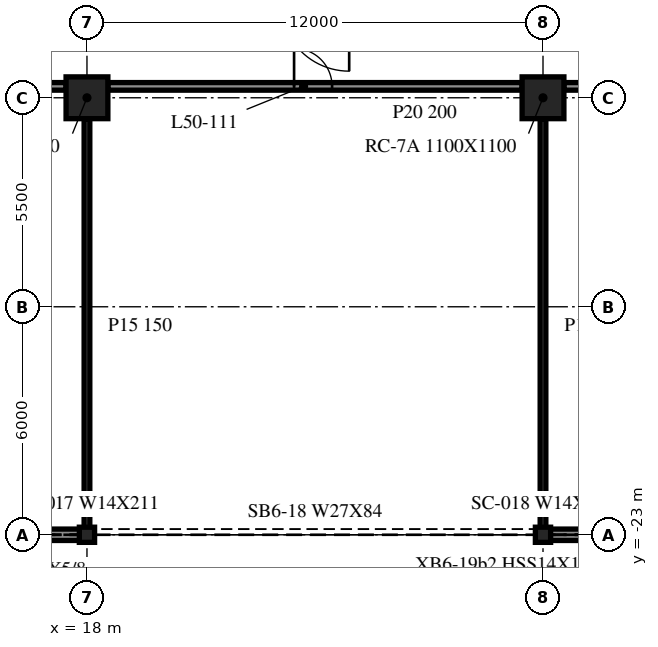
"""IFC4 building model, lengths in metres.
Left out: names, types, materials, properties, quantities, classifications, styles, units other than length and angle.
Written with IfcOpenShell. Run it as: python <this file> out.ifc"""

import sys

from ifc_helpers import new_model, si_unit, direction, frame, frame_2d, origin, origin_2d, place, context, subcontext, project, spatial, rectangle, i_section, extrude, element, fill, save


model = new_model("IFC4")
c1 = context("Model", 3, precision=1e-05, world=origin(), true_north=direction((0.0, 1.0)))
c2 = subcontext(c1, "Body", "Model", "MODEL_VIEW")
j1 = project(units=[si_unit("LENGTHUNIT", "METRE"), si_unit("PLANEANGLEUNIT", "RADIAN")], contexts=[c1])
p1 = place(None, origin())
s1 = spatial("IfcSite", under=j1, at=p1, CompositionType="ELEMENT")
p2 = place(p1, origin())
s2 = spatial("IfcBuilding", under=s1, at=p2, CompositionType="ELEMENT")
p3 = place(p2, frame((0.0, 0.0, 209.1)))
s3 = spatial("IfcBuildingStorey", under=s2, at=p3, CompositionType="ELEMENT", Elevation=209.1)
for number, where, z_axis, x_axis in (
    (1, (18.0, -11.5, -0.34), (0.0, 0.0, 1.0), (1.0, 0.0, 0.0)),
    (2, (30.0, -11.5, -0.34), (0.0, 0.0, 1.0), (1.0, 0.0, 0.0)),
):
    element("IfcColumn", number, at=place(p3, frame(where, z_axis=z_axis, x_axis=x_axis)), inside=s3, PredefinedType="COLUMN", context=c2, shape_type="SweptSolid", body=[
        extrude(rectangle(XDim=1.1, YDim=1.1, at=origin_2d()), origin(), (0.0, 0.0, 1.0), 3.8),
    ])
for number, where, z_axis, x_axis in (
    (3, (18.0, -23.0, -0.34), (0.0, 0.0, 1.0), (1.0, 0.0, 0.0)),
    (4, (30.0, -23.0, -0.34), (0.0, 0.0, 1.0), (1.0, 0.0, 0.0)),
):
    element("IfcColumn", number, at=place(p3, frame(where, z_axis=z_axis, x_axis=x_axis)), inside=s3, PredefinedType="COLUMN", context=c2, shape_type="SweptSolid", body=[
        extrude(i_section(OverallWidth=0.401, OverallDepth=0.399, WebThickness=0.025, FlangeThickness=0.04, at=origin_2d()), origin(), (0.0, 0.0, 1.0), 3.8),
    ])
for number, where, z_axis, x_axis in (
    (5, (6.012, -23.0, 0.0), (0.0, 0.0, 1.0), (1.0, 0.0, 0.0)),
    (6, (30.012, -23.0, 0.0), (0.0, 0.0, 1.0), (1.0, 0.0, 0.0)),
):
    element("IfcWall", number, at=place(p3, frame(where, z_axis=z_axis, x_axis=x_axis)), inside=s3, PredefinedType="NOTDEFINED", context=c2, shape_type="SweptSolid", body=[
        extrude(rectangle(XDim=11.975, YDim=0.3, at=frame_2d((5.988, 0.0))), origin(), (0.0, 0.0, 1.0), 2.782),
    ])
p4 = place(p3, frame((6.55, -11.2, 0.0), z_axis=(0.0, 0.0, 1.0), x_axis=(1.0, 0.0, 0.0)))
e7 = element("IfcWall", 7, at=p4, inside=s3, PredefinedType="PARTITIONING", context=c2, shape_type="SweptSolid", body=[
    extrude(rectangle(XDim=10.9, YDim=0.2, at=frame_2d((5.45, 0.0))), origin(), (0.0, 0.0, 1.0), 3.46),
])
p5 = place(p4, frame((1.3, 0.0, 0.0)))
e8 = element("IfcOpeningElement", 8, at=p5, cuts=e7, PredefinedType="OPENING", context=c2, shape_type="SweptSolid", body=[
    extrude(rectangle(XDim=0.9, YDim=2.1, at=frame_2d((0.45, 1.05))), frame((0.0, 0.11, 0.0), z_axis=(0.0, -1.0, 0.0), x_axis=(1.0, 0.0, 0.0)), (0.0, 0.0, 1.0), 0.22),
])
p6 = place(p4, frame((4.1, 0.0, 0.0)))
e9 = element("IfcOpeningElement", 9, at=p6, cuts=e7, PredefinedType="OPENING", context=c2, shape_type="SweptSolid", body=[
    extrude(rectangle(XDim=1.0, YDim=2.1, at=frame_2d((0.5, 1.05))), frame((0.0, 0.11, 0.0), z_axis=(0.0, -1.0, 0.0), x_axis=(1.0, 0.0, 0.0)), (0.0, 0.0, 1.0), 0.22),
])
p7 = place(p4, frame((5.7, 0.0, 0.0)))
e10 = element("IfcOpeningElement", 10, at=p7, cuts=e7, PredefinedType="OPENING", context=c2, shape_type="SweptSolid", body=[
    extrude(rectangle(XDim=1.0, YDim=2.1, at=frame_2d((0.5, 1.05))), frame((0.0, 0.11, 0.0), z_axis=(0.0, -1.0, 0.0), x_axis=(1.0, 0.0, 0.0)), (0.0, 0.0, 1.0), 0.22),
])
p8 = place(p3, frame((18.55, -11.2, 0.0), z_axis=(0.0, 0.0, 1.0), x_axis=(1.0, 0.0, 0.0)))
e11 = element("IfcWall", 11, at=p8, inside=s3, PredefinedType="PARTITIONING", context=c2, shape_type="SweptSolid", body=[
    extrude(rectangle(XDim=10.9, YDim=0.2, at=frame_2d((5.45, 0.0))), origin(), (0.0, 0.0, 1.0), 3.46),
])
p9 = place(p8, frame((4.9, 0.0, 0.0)))
e12 = element("IfcOpeningElement", 12, at=p9, cuts=e11, PredefinedType="OPENING", context=c2, shape_type="SweptSolid", body=[
    extrude(rectangle(XDim=1.0, YDim=2.1, at=frame_2d((0.5, 1.05))), frame((0.0, 0.11, 0.0), z_axis=(0.0, -1.0, 0.0), x_axis=(1.0, 0.0, 0.0)), (0.0, 0.0, 1.0), 0.22),
])
p10 = place(p3, frame((30.55, -11.2, 0.0), z_axis=(0.0, 0.0, 1.0), x_axis=(1.0, 0.0, 0.0)))
e13 = element("IfcWall", 13, at=p10, inside=s3, PredefinedType="PARTITIONING", context=c2, shape_type="SweptSolid", body=[
    extrude(rectangle(XDim=10.9, YDim=0.2, at=frame_2d((5.45, 0.0))), origin(), (0.0, 0.0, 1.0), 3.46),
])
p11 = place(p10, frame((1.3, 0.0, 0.0)))
e14 = element("IfcOpeningElement", 14, at=p11, cuts=e13, PredefinedType="OPENING", context=c2, shape_type="SweptSolid", body=[
    extrude(rectangle(XDim=0.9, YDim=2.1, at=frame_2d((0.45, 1.05))), frame((0.0, 0.11, 0.0), z_axis=(0.0, -1.0, 0.0), x_axis=(1.0, 0.0, 0.0)), (0.0, 0.0, 1.0), 0.22),
])
p12 = place(p10, frame((4.1, 0.0, 0.0)))
e15 = element("IfcOpeningElement", 15, at=p12, cuts=e13, PredefinedType="OPENING", context=c2, shape_type="SweptSolid", body=[
    extrude(rectangle(XDim=1.0, YDim=2.1, at=frame_2d((0.5, 1.05))), frame((0.0, 0.11, 0.0), z_axis=(0.0, -1.0, 0.0), x_axis=(1.0, 0.0, 0.0)), (0.0, 0.0, 1.0), 0.22),
])
p13 = place(p10, frame((5.7, 0.0, 0.0)))
e16 = element("IfcOpeningElement", 16, at=p13, cuts=e13, PredefinedType="OPENING", context=c2, shape_type="SweptSolid", body=[
    extrude(rectangle(XDim=0.9, YDim=2.1, at=frame_2d((0.45, 1.05))), frame((0.0, 0.11, 0.0), z_axis=(0.0, -1.0, 0.0), x_axis=(1.0, 0.0, 0.0)), (0.0, 0.0, 1.0), 0.22),
])
for number, where, z_axis, x_axis in (
    (17, (18.0, -22.975, 0.0), (0.0, 0.0, 1.0), (0.0, 1.0, 0.0)),
    (18, (30.0, -22.975, 0.0), (0.0, 0.0, 1.0), (0.0, 1.0, 0.0)),
):
    element("IfcWall", number, at=place(p3, frame(where, z_axis=z_axis, x_axis=x_axis)), inside=s3, PredefinedType="PARTITIONING", context=c2, shape_type="SweptSolid", body=[
        extrude(rectangle(XDim=10.925, YDim=0.15, at=frame_2d((5.462, 0.0))), origin(), (0.0, 0.0, 1.0), 3.46),
    ])
p14 = place(p9, origin())
e19 = element("IfcDoor", 19, at=p14, inside=s3, OperationType="SINGLE_SWING_RIGHT", PredefinedType="DOOR", context=c2, shape_type="SweptSolid", body=[
    extrude(rectangle(XDim=1.0, YDim=2.1, at=frame_2d((0.5, 1.05))), frame((0.0, 0.025, 0.0), z_axis=(0.0, -1.0, 0.0), x_axis=(1.0, 0.0, 0.0)), (0.0, 0.0, 1.0), 0.05),
])
fill(e12, e19)
save(model, sys.argv[1])
